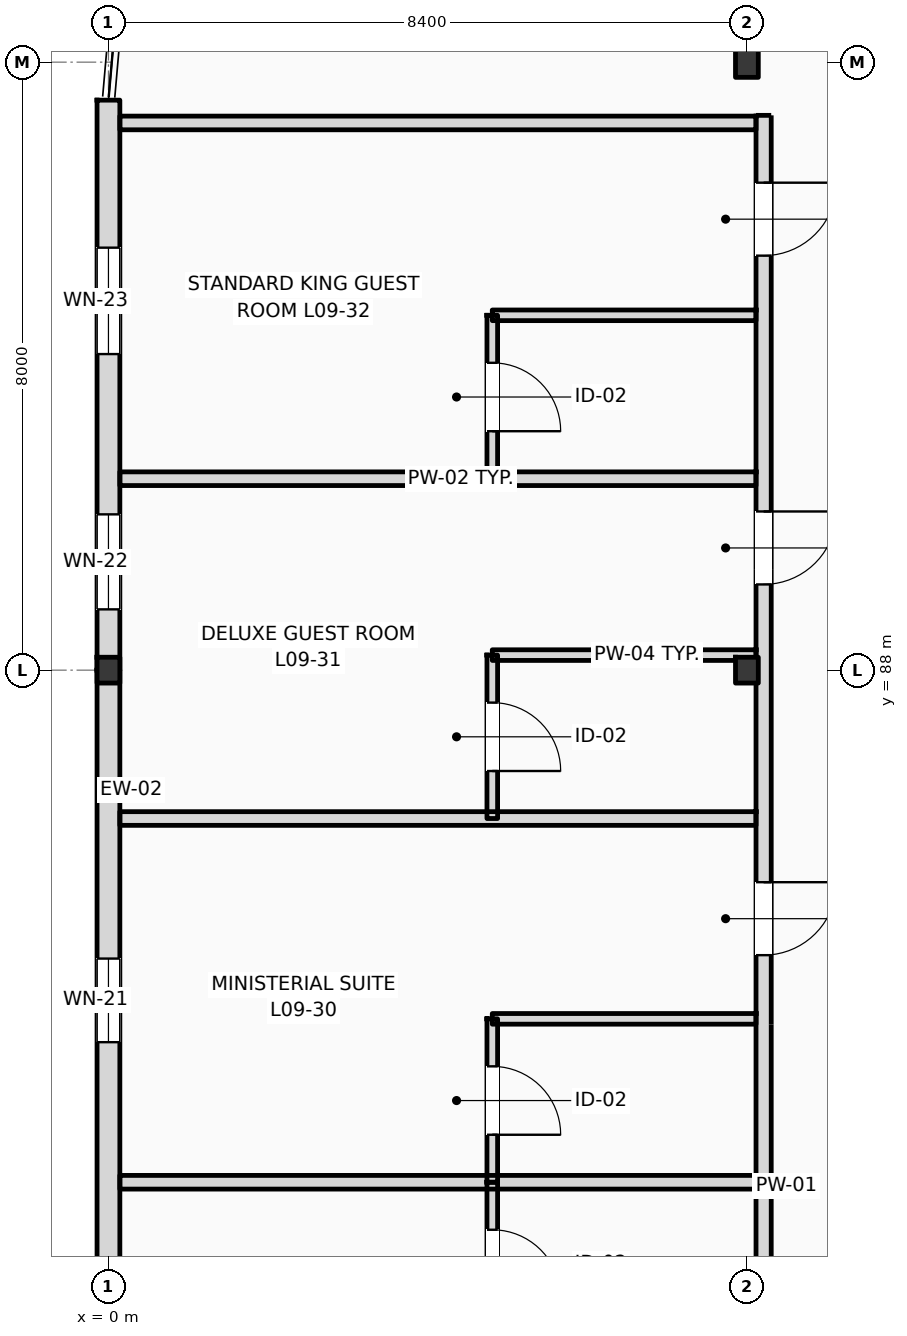
"""IFC4 building model, lengths in metres.
Left out: names, types, materials, properties, quantities, classifications, styles, units other than length and angle.
Written with IfcOpenShell. Run it as: python <this file> out.ifc"""

import sys

from ifc_helpers import new_model, si_unit, direction, frame, frame_2d, origin, origin_2d, place, context, subcontext, project, spatial, rectangle, i_section, extrude, element, fill, save


model = new_model("IFC4")
c1 = context("Model", 3, precision=1e-05, world=origin(), true_north=direction((0.0, 1.0)))
c2 = subcontext(c1, "Body", "Model", "MODEL_VIEW")
j1 = project(units=[si_unit("LENGTHUNIT", "METRE"), si_unit("PLANEANGLEUNIT", "RADIAN")], contexts=[c1])
p1 = place(None, origin())
s1 = spatial("IfcSite", under=j1, at=p1, CompositionType="ELEMENT")
p2 = place(p1, origin())
s2 = spatial("IfcBuilding", under=s1, at=p2, CompositionType="ELEMENT")
p3 = place(p2, frame((0.0, 0.0, 39.0)))
s3 = spatial("IfcBuildingStorey", under=s2, at=p3, CompositionType="ELEMENT", Elevation=39.0)
for number, where, z_axis, x_axis in (
    (1, (0.0, 88.0, 0.0), (0.0, 0.0, 1.0), (1.0, 0.0, 0.0)),
    (2, (8.4, 88.0, 0.0), (0.0, 0.0, 1.0), (1.0, 0.0, 0.0)),
):
    element("IfcColumn", number, at=place(p3, frame(where, z_axis=z_axis, x_axis=x_axis)), inside=s3, PredefinedType="COLUMN", context=c2, shape_type="SweptSolid", body=[
        extrude(i_section(OverallWidth=0.3, OverallDepth=0.34, WebThickness=0.012, FlangeThickness=0.021, FilletRadius=0.027, at=origin_2d()), origin(), (0.0, 0.0, 1.0), 3.6),
    ])
p4 = place(p3, frame((8.4, 96.0, 0.0), z_axis=(0.0, 0.0, 1.0), x_axis=(1.0, 0.0, 0.0)))
e3 = element("IfcColumn", 3, at=p4, inside=s3, PredefinedType="COLUMN", context=c2, shape_type="SweptSolid", body=[
    extrude(i_section(OverallWidth=0.3, OverallDepth=0.4, WebThickness=0.013, FlangeThickness=0.024, FilletRadius=0.027, at=origin_2d()), origin(), (0.0, 0.0, 1.0), 3.6),
])
p5 = place(p3, frame((0.0, 79.5, 0.0), z_axis=(0.0, 0.0, 1.0), x_axis=(0.0, 1.0, 0.0)))
e4 = element("IfcWall", 4, at=p5, inside=s3, PredefinedType="STANDARD", context=c2, shape_type="SweptSolid", body=[
    extrude(rectangle(XDim=8.5, YDim=0.3, at=frame_2d((4.25, 0.0))), origin(), (0.0, 0.0, 1.0), 3.01),
])
p6 = place(p5, frame((3.605, 0.0, 0.9)))
e5 = element("IfcOpeningElement", 5, at=p6, cuts=e4, PredefinedType="OPENING", context=c2, shape_type="SweptSolid", body=[
    extrude(rectangle(XDim=1.1, YDim=1.5, at=frame_2d((0.55, 0.75))), frame((0.0, 0.16, 0.0), z_axis=(0.0, -1.0, 0.0), x_axis=(1.0, 0.0, 0.0)), (0.0, 0.0, 1.0), 0.32),
])
p7 = place(p3, frame((0.0, 88.0, 0.0), z_axis=(0.0, 0.0, 1.0), x_axis=(0.0, 1.0, 0.0)))
e6 = element("IfcWall", 6, at=p7, inside=s3, PredefinedType="STANDARD", context=c2, shape_type="SweptSolid", body=[
    extrude(rectangle(XDim=7.5, YDim=0.3, at=frame_2d((3.75, 0.0))), origin(), (0.0, 0.0, 1.0), 3.38),
])
p8 = place(p7, frame((0.8, 0.0, 0.9)))
e7 = element("IfcOpeningElement", 7, at=p8, cuts=e6, PredefinedType="OPENING", context=c2, shape_type="SweptSolid", body=[
    extrude(rectangle(XDim=1.25, YDim=1.6, at=frame_2d((0.625, 0.8))), frame((0.0, 0.16, 0.0), z_axis=(0.0, -1.0, 0.0), x_axis=(1.0, 0.0, 0.0)), (0.0, 0.0, 1.0), 0.32),
])
p9 = place(p7, frame((4.159, 0.0, 0.9)))
e8 = element("IfcOpeningElement", 8, at=p9, cuts=e6, PredefinedType="OPENING", context=c2, shape_type="SweptSolid", body=[
    extrude(rectangle(XDim=1.4, YDim=1.7, at=frame_2d((0.7, 0.85))), frame((0.0, 0.16, 0.0), z_axis=(0.0, -1.0, 0.0), x_axis=(1.0, 0.0, 0.0)), (0.0, 0.0, 1.0), 0.32),
])
p10 = place(p3, frame((8.62, 62.64, 0.0), z_axis=(0.0, 0.0, 1.0), x_axis=(0.0, 1.0, 0.0)))
e9 = element("IfcWall", 9, at=p10, inside=s3, PredefinedType="PARTITIONING", context=c2, shape_type="SweptSolid", body=[
    extrude(rectangle(XDim=32.66, YDim=0.2, at=frame_2d((16.33, 0.0))), origin(), (0.0, 0.0, 1.0), 2.91),
])
p11 = place(p10, frame((3.122, 0.0, 0.0)))
e10 = element("IfcOpeningElement", 10, at=p11, cuts=e9, PredefinedType="OPENING", context=c2, shape_type="SweptSolid", body=[
    extrude(rectangle(XDim=0.96, YDim=2.2, at=frame_2d((0.48, 1.1))), frame((0.0, 0.11, 0.0), z_axis=(0.0, -1.0, 0.0), x_axis=(1.0, 0.0, 0.0)), (0.0, 0.0, 1.0), 0.22),
])
p12 = place(p10, frame((5.575, 0.0, 0.0)))
e11 = element("IfcOpeningElement", 11, at=p12, cuts=e9, PredefinedType="OPENING", context=c2, shape_type="SweptSolid", body=[
    extrude(rectangle(XDim=0.96, YDim=2.2, at=frame_2d((0.48, 1.1))), frame((0.0, 0.11, 0.0), z_axis=(0.0, -1.0, 0.0), x_axis=(1.0, 0.0, 0.0)), (0.0, 0.0, 1.0), 0.22),
])
p13 = place(p10, frame((12.353, 0.0, 0.0)))
e12 = element("IfcOpeningElement", 12, at=p13, cuts=e9, PredefinedType="OPENING", context=c2, shape_type="SweptSolid", body=[
    extrude(rectangle(XDim=0.96, YDim=2.2, at=frame_2d((0.48, 1.1))), frame((0.0, 0.11, 0.0), z_axis=(0.0, -1.0, 0.0), x_axis=(1.0, 0.0, 0.0)), (0.0, 0.0, 1.0), 0.22),
])
p14 = place(p10, frame((14.581, 0.0, 0.0)))
e13 = element("IfcOpeningElement", 13, at=p14, cuts=e9, PredefinedType="OPENING", context=c2, shape_type="SweptSolid", body=[
    extrude(rectangle(XDim=0.96, YDim=2.2, at=frame_2d((0.48, 1.1))), frame((0.0, 0.11, 0.0), z_axis=(0.0, -1.0, 0.0), x_axis=(1.0, 0.0, 0.0)), (0.0, 0.0, 1.0), 0.22),
])
p15 = place(p10, frame((21.61, 0.0, 0.0)))
e14 = element("IfcOpeningElement", 14, at=p15, cuts=e9, PredefinedType="OPENING", context=c2, shape_type="SweptSolid", body=[
    extrude(rectangle(XDim=0.96, YDim=2.2, at=frame_2d((0.48, 1.1))), frame((0.0, 0.11, 0.0), z_axis=(0.0, -1.0, 0.0), x_axis=(1.0, 0.0, 0.0)), (0.0, 0.0, 1.0), 0.22),
])
p16 = place(p10, frame((26.488, 0.0, 0.0)))
e15 = element("IfcOpeningElement", 15, at=p16, cuts=e9, PredefinedType="OPENING", context=c2, shape_type="SweptSolid", body=[
    extrude(rectangle(XDim=0.96, YDim=2.2, at=frame_2d((0.48, 1.1))), frame((0.0, 0.11, 0.0), z_axis=(0.0, -1.0, 0.0), x_axis=(1.0, 0.0, 0.0)), (0.0, 0.0, 1.0), 0.22),
])
p17 = place(p10, frame((30.814, 0.0, 0.0)))
e16 = element("IfcOpeningElement", 16, at=p17, cuts=e9, PredefinedType="OPENING", context=c2, shape_type="SweptSolid", body=[
    extrude(rectangle(XDim=0.96, YDim=2.2, at=frame_2d((0.48, 1.1))), frame((0.0, 0.11, 0.0), z_axis=(0.0, -1.0, 0.0), x_axis=(1.0, 0.0, 0.0)), (0.0, 0.0, 1.0), 0.22),
])
p18 = place(p3, frame((0.15, 81.262, 0.0), z_axis=(0.0, 0.0, 1.0), x_axis=(1.0, 0.0, 0.0)))
e17 = element("IfcWall", 17, at=p18, inside=s3, PredefinedType="PARTITIONING", context=c2, shape_type="SweptSolid", body=[
    extrude(rectangle(XDim=8.37, YDim=0.18, at=frame_2d((4.185, 0.0))), origin(), (0.0, 0.0, 1.0), 3.38),
])
p19 = place(p3, frame((5.05, 79.112, 0.0), z_axis=(0.0, 0.0, 1.0), x_axis=(0.0, 1.0, 0.0)))
e18 = element("IfcWall", 18, at=p19, inside=s3, PredefinedType="PARTITIONING", context=c2, shape_type="SweptSolid", body=[
    extrude(rectangle(XDim=2.15, YDim=0.14, at=frame_2d((1.075, 0.0))), origin(), (0.0, 0.0, 1.0), 3.38),
])
p20 = place(p19, frame((0.625, 0.0, 0.0)))
e19 = element("IfcOpeningElement", 19, at=p20, cuts=e18, PredefinedType="OPENING", context=c2, shape_type="SweptSolid", body=[
    extrude(rectangle(XDim=0.9, YDim=2.1, at=frame_2d((0.45, 1.05))), frame((0.0, 0.08, 0.0), z_axis=(0.0, -1.0, 0.0), x_axis=(1.0, 0.0, 0.0)), (0.0, 0.0, 1.0), 0.16),
])
p21 = place(p3, frame((0.15, 86.048, 0.0), z_axis=(0.0, 0.0, 1.0), x_axis=(1.0, 0.0, 0.0)))
e20 = element("IfcWall", 20, at=p21, inside=s3, PredefinedType="PARTITIONING", context=c2, shape_type="SweptSolid", body=[
    extrude(rectangle(XDim=8.37, YDim=0.18, at=frame_2d((4.185, 0.0))), origin(), (0.0, 0.0, 1.0), 3.38),
])
p22 = place(p3, frame((5.05, 83.412, 0.0), z_axis=(0.0, 0.0, 1.0), x_axis=(1.0, 0.0, 0.0)))
e21 = element("IfcWall", 21, at=p22, inside=s3, PredefinedType="PARTITIONING", context=c2, shape_type="SweptSolid", body=[
    extrude(rectangle(XDim=3.47, YDim=0.14, at=frame_2d((1.735, 0.0))), origin(), (0.0, 0.0, 1.0), 3.38),
])
p23 = place(p3, frame((5.05, 81.262, 0.0), z_axis=(0.0, 0.0, 1.0), x_axis=(0.0, 1.0, 0.0)))
e22 = element("IfcWall", 22, at=p23, inside=s3, PredefinedType="PARTITIONING", context=c2, shape_type="SweptSolid", body=[
    extrude(rectangle(XDim=2.15, YDim=0.14, at=frame_2d((1.075, 0.0))), origin(), (0.0, 0.0, 1.0), 3.38),
])
p24 = place(p23, frame((0.625, 0.0, 0.0)))
e23 = element("IfcOpeningElement", 23, at=p24, cuts=e22, PredefinedType="OPENING", context=c2, shape_type="SweptSolid", body=[
    extrude(rectangle(XDim=0.9, YDim=2.1, at=frame_2d((0.45, 1.05))), frame((0.0, 0.08, 0.0), z_axis=(0.0, -1.0, 0.0), x_axis=(1.0, 0.0, 0.0)), (0.0, 0.0, 1.0), 0.16),
])
p25 = place(p3, frame((0.15, 90.519, 0.0), z_axis=(0.0, 0.0, 1.0), x_axis=(1.0, 0.0, 0.0)))
e24 = element("IfcWall", 24, at=p25, inside=s3, PredefinedType="PARTITIONING", context=c2, shape_type="SweptSolid", body=[
    extrude(rectangle(XDim=8.37, YDim=0.18, at=frame_2d((4.185, 0.0))), origin(), (0.0, 0.0, 1.0), 3.38),
])
p26 = place(p3, frame((5.05, 88.198, 0.0), z_axis=(0.0, 0.0, 1.0), x_axis=(1.0, 0.0, 0.0)))
e25 = element("IfcWall", 25, at=p26, inside=s3, PredefinedType="PARTITIONING", context=c2, shape_type="SweptSolid", body=[
    extrude(rectangle(XDim=3.47, YDim=0.14, at=frame_2d((1.735, 0.0))), origin(), (0.0, 0.0, 1.0), 2.82),
])
p27 = place(p3, frame((5.05, 86.048, 0.0), z_axis=(0.0, 0.0, 1.0), x_axis=(0.0, 1.0, 0.0)))
e26 = element("IfcWall", 26, at=p27, inside=s3, PredefinedType="PARTITIONING", context=c2, shape_type="SweptSolid", body=[
    extrude(rectangle(XDim=2.15, YDim=0.14, at=frame_2d((1.075, 0.0))), origin(), (0.0, 0.0, 1.0), 3.38),
])
p28 = place(p27, frame((0.625, 0.0, 0.0)))
e27 = element("IfcOpeningElement", 27, at=p28, cuts=e26, PredefinedType="OPENING", context=c2, shape_type="SweptSolid", body=[
    extrude(rectangle(XDim=0.9, YDim=2.1, at=frame_2d((0.45, 1.05))), frame((0.0, 0.08, 0.0), z_axis=(0.0, -1.0, 0.0), x_axis=(1.0, 0.0, 0.0)), (0.0, 0.0, 1.0), 0.16),
])
p29 = place(p3, frame((0.15, 95.2, 0.0), z_axis=(0.0, 0.0, 1.0), x_axis=(1.0, 0.0, 0.0)))
e28 = element("IfcWall", 28, at=p29, inside=s3, PredefinedType="PARTITIONING", context=c2, shape_type="SweptSolid", body=[
    extrude(rectangle(XDim=8.37, YDim=0.18, at=frame_2d((4.185, 0.0))), origin(), (0.0, 0.0, 1.0), 3.38),
])
p30 = place(p3, frame((5.05, 92.669, 0.0), z_axis=(0.0, 0.0, 1.0), x_axis=(1.0, 0.0, 0.0)))
e29 = element("IfcWall", 29, at=p30, inside=s3, PredefinedType="PARTITIONING", context=c2, shape_type="SweptSolid", body=[
    extrude(rectangle(XDim=3.47, YDim=0.14, at=frame_2d((1.735, 0.0))), origin(), (0.0, 0.0, 1.0), 3.38),
])
p31 = place(p3, frame((5.05, 90.519, 0.0), z_axis=(0.0, 0.0, 1.0), x_axis=(0.0, 1.0, 0.0)))
e30 = element("IfcWall", 30, at=p31, inside=s3, PredefinedType="PARTITIONING", context=c2, shape_type="SweptSolid", body=[
    extrude(rectangle(XDim=2.15, YDim=0.14, at=frame_2d((1.075, 0.0))), origin(), (0.0, 0.0, 1.0), 3.38),
])
p32 = place(p31, frame((0.625, 0.0, 0.0)))
e31 = element("IfcOpeningElement", 31, at=p32, cuts=e30, PredefinedType="OPENING", context=c2, shape_type="SweptSolid", body=[
    extrude(rectangle(XDim=0.9, YDim=2.1, at=frame_2d((0.45, 1.05))), frame((0.0, 0.08, 0.0), z_axis=(0.0, -1.0, 0.0), x_axis=(1.0, 0.0, 0.0)), (0.0, 0.0, 1.0), 0.16),
])
p33 = place(p6, origin())
e32 = element("IfcWindow", 32, at=p33, inside=s3, PartitioningType="DOUBLE_PANEL_VERTICAL", PredefinedType="WINDOW", context=c2, shape_type="SweptSolid", body=[
    extrude(rectangle(XDim=1.1, YDim=1.5, at=frame_2d((0.55, 0.75))), frame((0.0, 0.03, 0.0), z_axis=(0.0, -1.0, 0.0), x_axis=(1.0, 0.0, 0.0)), (0.0, 0.0, 1.0), 0.06),
])
fill(e5, e32)
p34 = place(p8, origin())
e33 = element("IfcWindow", 33, at=p34, inside=s3, PartitioningType="DOUBLE_PANEL_VERTICAL", PredefinedType="WINDOW", context=c2, shape_type="SweptSolid", body=[
    extrude(rectangle(XDim=1.25, YDim=1.6, at=frame_2d((0.625, 0.8))), frame((0.0, 0.03, 0.0), z_axis=(0.0, -1.0, 0.0), x_axis=(1.0, 0.0, 0.0)), (0.0, 0.0, 1.0), 0.06),
])
fill(e7, e33)
p35 = place(p9, origin())
e34 = element("IfcWindow", 34, at=p35, inside=s3, PartitioningType="DOUBLE_PANEL_VERTICAL", PredefinedType="WINDOW", context=c2, shape_type="SweptSolid", body=[
    extrude(rectangle(XDim=1.4, YDim=1.7, at=frame_2d((0.7, 0.85))), frame((0.0, 0.03, 0.0), z_axis=(0.0, -1.0, 0.0), x_axis=(1.0, 0.0, 0.0)), (0.0, 0.0, 1.0), 0.06),
])
fill(e8, e34)
p36 = place(p20, frame((0.9, 0.0, 0.0), z_axis=(0.0, 0.0, 1.0), x_axis=(-1.0, 0.0, 0.0)))
e35 = element("IfcDoor", 35, at=p36, inside=s3, OperationType="SINGLE_SWING_LEFT", PredefinedType="DOOR", context=c2, shape_type="SweptSolid", body=[
    extrude(rectangle(XDim=0.9, YDim=2.1, at=frame_2d((0.45, 1.05))), frame((0.0, 0.025, 0.0), z_axis=(0.0, -1.0, 0.0), x_axis=(1.0, 0.0, 0.0)), (0.0, 0.0, 1.0), 0.05),
])
fill(e19, e35)
p37 = place(p15, frame((0.96, 0.0, 0.0), z_axis=(0.0, 0.0, 1.0), x_axis=(-1.0, 0.0, 0.0)))
e36 = element("IfcDoor", 36, at=p37, inside=s3, OperationType="SINGLE_SWING_RIGHT", PredefinedType="DOOR", context=c2, shape_type="SweptSolid", body=[
    extrude(rectangle(XDim=0.96, YDim=2.2, at=frame_2d((0.48, 1.1))), frame((0.0, 0.025, 0.0), z_axis=(0.0, -1.0, 0.0), x_axis=(1.0, 0.0, 0.0)), (0.0, 0.0, 1.0), 0.05),
])
fill(e14, e36)
p38 = place(p24, frame((0.9, 0.0, 0.0), z_axis=(0.0, 0.0, 1.0), x_axis=(-1.0, 0.0, 0.0)))
e37 = element("IfcDoor", 37, at=p38, inside=s3, OperationType="SINGLE_SWING_LEFT", PredefinedType="DOOR", context=c2, shape_type="SweptSolid", body=[
    extrude(rectangle(XDim=0.9, YDim=2.1, at=frame_2d((0.45, 1.05))), frame((0.0, 0.025, 0.0), z_axis=(0.0, -1.0, 0.0), x_axis=(1.0, 0.0, 0.0)), (0.0, 0.0, 1.0), 0.05),
])
fill(e23, e37)
p39 = place(p16, frame((0.96, 0.0, 0.0), z_axis=(0.0, 0.0, 1.0), x_axis=(-1.0, 0.0, 0.0)))
e38 = element("IfcDoor", 38, at=p39, inside=s3, OperationType="SINGLE_SWING_RIGHT", PredefinedType="DOOR", context=c2, shape_type="SweptSolid", body=[
    extrude(rectangle(XDim=0.96, YDim=2.2, at=frame_2d((0.48, 1.1))), frame((0.0, 0.025, 0.0), z_axis=(0.0, -1.0, 0.0), x_axis=(1.0, 0.0, 0.0)), (0.0, 0.0, 1.0), 0.05),
])
fill(e15, e38)
p40 = place(p28, frame((0.9, 0.0, 0.0), z_axis=(0.0, 0.0, 1.0), x_axis=(-1.0, 0.0, 0.0)))
e39 = element("IfcDoor", 39, at=p40, inside=s3, OperationType="SINGLE_SWING_LEFT", PredefinedType="DOOR", context=c2, shape_type="SweptSolid", body=[
    extrude(rectangle(XDim=0.9, YDim=2.1, at=frame_2d((0.45, 1.05))), frame((0.0, 0.025, 0.0), z_axis=(0.0, -1.0, 0.0), x_axis=(1.0, 0.0, 0.0)), (0.0, 0.0, 1.0), 0.05),
])
fill(e27, e39)
p41 = place(p17, frame((0.96, 0.0, 0.0), z_axis=(0.0, 0.0, 1.0), x_axis=(-1.0, 0.0, 0.0)))
e40 = element("IfcDoor", 40, at=p41, inside=s3, OperationType="SINGLE_SWING_RIGHT", PredefinedType="DOOR", context=c2, shape_type="SweptSolid", body=[
    extrude(rectangle(XDim=0.96, YDim=2.2, at=frame_2d((0.48, 1.1))), frame((0.0, 0.025, 0.0), z_axis=(0.0, -1.0, 0.0), x_axis=(1.0, 0.0, 0.0)), (0.0, 0.0, 1.0), 0.05),
])
fill(e16, e40)
p42 = place(p32, frame((0.9, 0.0, 0.0), z_axis=(0.0, 0.0, 1.0), x_axis=(-1.0, 0.0, 0.0)))
e41 = element("IfcDoor", 41, at=p42, inside=s3, OperationType="SINGLE_SWING_LEFT", PredefinedType="DOOR", context=c2, shape_type="SweptSolid", body=[
    extrude(rectangle(XDim=0.9, YDim=2.1, at=frame_2d((0.45, 1.05))), frame((0.0, 0.025, 0.0), z_axis=(0.0, -1.0, 0.0), x_axis=(1.0, 0.0, 0.0)), (0.0, 0.0, 1.0), 0.05),
])
fill(e31, e41)
save(model, sys.argv[1])
